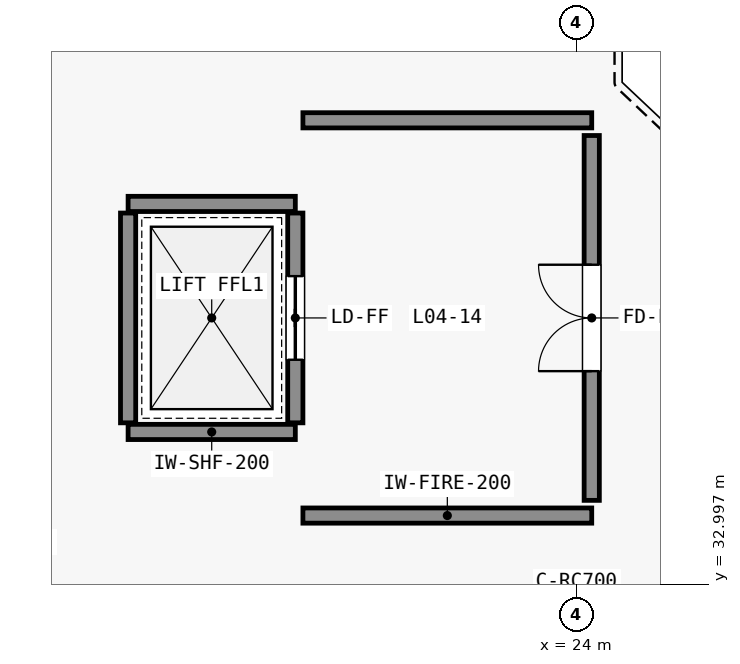
"""IFC4 building model, lengths in metres.
Left out: names, types, materials, properties, quantities, classifications, styles, units other than length and angle.
Written with IfcOpenShell. Run it as: python <this file> out.ifc"""

import sys

from ifc_helpers import new_model, si_unit, direction, frame, frame_2d, origin, place, context, subcontext, project, spatial, rectangle, extrude, element, fill, save


model = new_model("IFC4")
c1 = context("Model", 3, precision=1e-05, world=origin(), true_north=direction((0.0, 1.0)))
c2 = subcontext(c1, "Body", "Model", "MODEL_VIEW")
j1 = project(units=[si_unit("LENGTHUNIT", "METRE"), si_unit("PLANEANGLEUNIT", "RADIAN")], contexts=[c1])
p1 = place(None, origin())
s1 = spatial("IfcSite", under=j1, at=p1, CompositionType="ELEMENT")
p2 = place(p1, origin())
s2 = spatial("IfcBuilding", under=s1, at=p2, CompositionType="ELEMENT")
p3 = place(p2, frame((0.0, 0.0, 21.0)))
s3 = spatial("IfcBuildingStorey", under=s2, at=p3, CompositionType="ELEMENT", Elevation=21.0)
for number, where, z_axis, x_axis in (
    (1, (18.1, 35.0, 0.0), (0.0, 0.0, 1.0), (1.0, 0.0, 0.0)),
    (2, (18.1, 38.0, 0.0), (0.0, 0.0, 1.0), (1.0, 0.0, 0.0)),
):
    element("IfcWall", number, at=place(p3, frame(where, z_axis=z_axis, x_axis=x_axis)), inside=s3, PredefinedType="STANDARD", context=c2, shape_type="SweptSolid", body=[
        extrude(rectangle(XDim=2.2, YDim=0.2, at=frame_2d((1.1, 0.0))), origin(), (0.0, 0.0, 1.0), 5.06),
    ])
p4 = place(p3, frame((18.1, 35.12, 0.0), z_axis=(0.0, 0.0, 1.0), x_axis=(0.0, 1.0, 0.0)))
e3 = element("IfcWall", 3, at=p4, inside=s3, PredefinedType="STANDARD", context=c2, shape_type="SweptSolid", body=[
    extrude(rectangle(XDim=2.76, YDim=0.2, at=frame_2d((1.38, 0.0))), origin(), (0.0, 0.0, 1.0), 5.06),
])
p5 = place(p3, frame((20.3, 35.12, 0.0), z_axis=(0.0, 0.0, 1.0), x_axis=(0.0, 1.0, 0.0)))
e4 = element("IfcWall", 4, at=p5, inside=s3, PredefinedType="STANDARD", context=c2, shape_type="SweptSolid", body=[
    extrude(rectangle(XDim=2.76, YDim=0.2, at=frame_2d((1.38, 0.0))), origin(), (0.0, 0.0, 1.0), 5.06),
])
p6 = place(p5, frame((0.83, 0.0, 0.0)))
e5 = element("IfcOpeningElement", 5, at=p6, cuts=e4, PredefinedType="OPENING", context=c2, shape_type="SweptSolid", body=[
    extrude(rectangle(XDim=1.1, YDim=2.15, at=frame_2d((0.55, 1.075))), frame((0.0, 0.11, 0.0), z_axis=(0.0, -1.0, 0.0), x_axis=(1.0, 0.0, 0.0)), (0.0, 0.0, 1.0), 0.22),
])
for number, where, z_axis, x_axis in (
    (6, (20.4, 33.9, 0.0), (0.0, 0.0, 1.0), (1.0, 0.0, 0.0)),
    (7, (20.4, 39.1, 0.0), (0.0, 0.0, 1.0), (1.0, 0.0, 0.0)),
):
    element("IfcWall", number, at=place(p3, frame(where, z_axis=z_axis, x_axis=x_axis)), inside=s3, PredefinedType="STANDARD", context=c2, shape_type="SweptSolid", body=[
        extrude(rectangle(XDim=3.8, YDim=0.2, at=frame_2d((1.9, 0.0))), origin(), (0.0, 0.0, 1.0), 4.21),
    ])
p7 = place(p3, frame((24.2, 34.1, 0.0), z_axis=(0.0, 0.0, 1.0), x_axis=(0.0, 1.0, 0.0)))
e8 = element("IfcWall", 8, at=p7, inside=s3, PredefinedType="STANDARD", context=c2, shape_type="SweptSolid", body=[
    extrude(rectangle(XDim=4.8, YDim=0.2, at=frame_2d((2.4, 0.0))), origin(), (0.0, 0.0, 1.0), 4.21),
])
p8 = place(p7, frame((1.7, 0.0, 0.0)))
e9 = element("IfcOpeningElement", 9, at=p8, cuts=e8, PredefinedType="OPENING", context=c2, shape_type="SweptSolid", body=[
    extrude(rectangle(XDim=1.4, YDim=2.2, at=frame_2d((0.7, 1.1))), frame((0.0, 0.11, 0.0), z_axis=(0.0, -1.0, 0.0), x_axis=(1.0, 0.0, 0.0)), (0.0, 0.0, 1.0), 0.22),
])
p9 = place(p6, origin())
e10 = element("IfcDoor", 10, at=p9, inside=s3, OperationType="SLIDING_TO_LEFT", PredefinedType="DOOR", context=c2, shape_type="SweptSolid", body=[
    extrude(rectangle(XDim=1.1, YDim=2.15, at=frame_2d((0.55, 1.075))), frame((0.0, 0.025, 0.0), z_axis=(0.0, -1.0, 0.0), x_axis=(1.0, 0.0, 0.0)), (0.0, 0.0, 1.0), 0.05),
])
fill(e5, e10)
p10 = place(p8, origin())
e11 = element("IfcDoor", 11, at=p10, inside=s3, OperationType="DOUBLE_DOOR_SINGLE_SWING", PredefinedType="DOOR", context=c2, shape_type="SweptSolid", body=[
    extrude(rectangle(XDim=1.4, YDim=2.2, at=frame_2d((0.7, 1.1))), frame((0.0, 0.025, 0.0), z_axis=(0.0, -1.0, 0.0), x_axis=(1.0, 0.0, 0.0)), (0.0, 0.0, 1.0), 0.05),
])
fill(e9, e11)
save(model, sys.argv[1])
